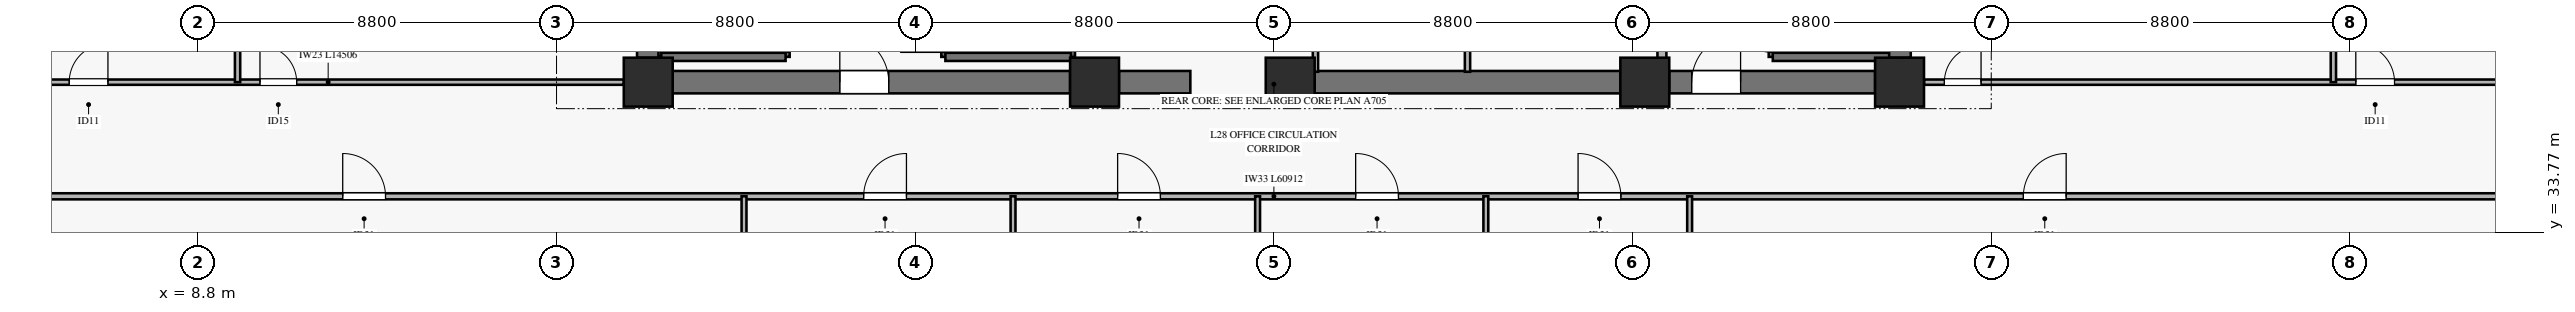
"""IFC4 building model, lengths in metres.
Left out: names, types, materials, properties, quantities, classifications, styles, units other than length and angle.
Written with IfcOpenShell. Run it as: python <this file> out.ifc"""

import sys

from ifc_helpers import new_model, si_unit, direction, frame, frame_2d, origin, origin_2d, place, context, subcontext, project, spatial, rectangle, extrude, source, transform, mapped, element, fill, save


model = new_model("IFC4")
c1 = context("Model", 3, precision=1e-05, world=origin(), true_north=direction((0.0, 1.0)))
c2 = subcontext(c1, "Body", "Model", "MODEL_VIEW")
j1 = project(units=[si_unit("LENGTHUNIT", "METRE"), si_unit("PLANEANGLEUNIT", "RADIAN")], contexts=[c1])
p1 = place(None, origin())
s1 = spatial("IfcSite", under=j1, at=p1, CompositionType="ELEMENT")
p2 = place(p1, origin())
s2 = spatial("IfcBuilding", under=s1, at=p2, CompositionType="ELEMENT")
p3 = place(p2, frame((0.0, 0.0, 115.3)))
s3 = spatial("IfcBuildingStorey", under=s2, at=p3, CompositionType="ELEMENT", Elevation=115.3)
m1 = source(origin(), c2, "Body", "SweptSolid", [
    extrude(rectangle(XDim=1.2, YDim=1.2, at=origin_2d()), origin(), (0.0, 0.0, 1.0), 3.68),
])
for number, where, z_axis, x_axis in (
    (1, (19.85, 37.45, 0.0), (0.0, 0.0, 1.0), (1.0, 0.0, 0.0)),
    (2, (30.8, 37.45, 0.0), (0.0, 0.0, 1.0), (1.0, 0.0, 0.0)),
    (3, (35.6, 37.45, 0.0), (0.0, 0.0, 1.0), (1.0, 0.0, 0.0)),
    (4, (44.3, 37.45, 0.0), (0.0, 0.0, 1.0), (1.0, 0.0, 0.0)),
    (5, (50.55, 37.45, 0.0), (0.0, 0.0, 1.0), (1.0, 0.0, 0.0)),
):
    element("IfcColumn", number, at=place(p3, frame(where, z_axis=z_axis, x_axis=x_axis)), inside=s3, PredefinedType="PILASTER", context=c2, shape_type="MappedRepresentation", body=[
        mapped(m1, transform((0.0, 0.0, 0.0), x_axis=(1.0, 0.0, 0.0), y_axis=(0.0, 1.0, 0.0), z_axis=(0.0, 0.0, 1.0), scale=1.0)),
    ])
p4 = place(p3, frame((20.45, 37.45, 0.0), z_axis=(0.0, 0.0, 1.0), x_axis=(1.0, 0.0, 0.0)))
e6 = element("IfcWall", 6, at=p4, inside=s3, PredefinedType="SHEAR", context=c2, shape_type="SweptSolid", body=[
    extrude(rectangle(XDim=9.75, YDim=0.55, at=frame_2d((4.875, 0.0))), origin(), (0.0, 0.0, 1.0), 3.68),
])
p5 = place(p4, frame((4.1, 0.0, 0.0)))
e7 = element("IfcOpeningElement", 7, at=p5, cuts=e6, PredefinedType="OPENING", context=c2, shape_type="SweptSolid", body=[
    extrude(rectangle(XDim=1.2, YDim=2.15, at=frame_2d((0.6, 1.075))), frame((0.0, 0.285, 0.0), z_axis=(0.0, -1.0, 0.0), x_axis=(1.0, 0.0, 0.0)), (0.0, 0.0, 1.0), 0.57),
])
p6 = place(p3, frame((31.4, 37.45, 0.0), z_axis=(0.0, 0.0, 1.0), x_axis=(1.0, 0.0, 0.0)))
e8 = element("IfcWall", 8, at=p6, inside=s3, PredefinedType="SHEAR", context=c2, shape_type="SweptSolid", body=[
    extrude(rectangle(XDim=1.75, YDim=0.55, at=frame_2d((0.875, 0.0))), origin(), (0.0, 0.0, 1.0), 3.68),
])
p7 = place(p3, frame((36.2, 37.45, 0.0), z_axis=(0.0, 0.0, 1.0), x_axis=(1.0, 0.0, 0.0)))
e9 = element("IfcWall", 9, at=p7, inside=s3, PredefinedType="SHEAR", context=c2, shape_type="SweptSolid", body=[
    extrude(rectangle(XDim=7.5, YDim=0.55, at=frame_2d((3.75, 0.0))), origin(), (0.0, 0.0, 1.0), 3.68),
])
p8 = place(p3, frame((44.9, 37.45, 0.0), z_axis=(0.0, 0.0, 1.0), x_axis=(1.0, 0.0, 0.0)))
e10 = element("IfcWall", 10, at=p8, inside=s3, PredefinedType="SHEAR", context=c2, shape_type="SweptSolid", body=[
    extrude(rectangle(XDim=5.05, YDim=0.55, at=frame_2d((2.525, 0.0))), origin(), (0.0, 0.0, 1.0), 3.68),
])
p9 = place(p8, frame((0.55, 0.0, 0.0)))
e11 = element("IfcOpeningElement", 11, at=p9, cuts=e10, PredefinedType="OPENING", context=c2, shape_type="SweptSolid", body=[
    extrude(rectangle(XDim=1.2, YDim=2.15, at=frame_2d((0.6, 1.075))), frame((0.0, 0.285, 0.0), z_axis=(0.0, -1.0, 0.0), x_axis=(1.0, 0.0, 0.0)), (0.0, 0.0, 1.0), 0.57),
])
for number, where, z_axis, x_axis in (
    (12, (19.85, 38.05, 0.0), (0.0, 0.0, 1.0), (0.0, 1.0, 0.0)),
    (13, (50.55, 38.05, 0.0), (0.0, 0.0, 1.0), (0.0, 1.0, 0.0)),
):
    element("IfcWall", number, at=place(p3, frame(where, z_axis=z_axis, x_axis=x_axis)), inside=s3, PredefinedType="SHEAR", context=c2, shape_type="SweptSolid", body=[
        extrude(rectangle(XDim=7.9, YDim=0.55, at=frame_2d((3.95, 0.0))), origin(), (0.0, 0.0, 1.0), 3.68),
    ])
p10 = place(p3, frame((20.17, 38.07, 0.0), z_axis=(0.0, 0.0, 1.0), x_axis=(0.0, 1.0, 0.0)))
e14 = element("IfcWall", 14, at=p10, inside=s3, PredefinedType="SOLIDWALL", context=c2, shape_type="SweptSolid", body=[
    extrude(rectangle(XDim=7.25, YDim=0.14, at=frame_2d((3.625, 0.0))), origin(), (0.0, 0.0, 1.0), 3.9),
])
p11 = place(p3, frame((23.22, 38.07, 0.0), z_axis=(0.0, 0.0, 1.0), x_axis=(0.0, 1.0, 0.0)))
e15 = element("IfcWall", 15, at=p11, inside=s3, PredefinedType="SOLIDWALL", context=c2, shape_type="SweptSolid", body=[
    extrude(rectangle(XDim=7.25, YDim=0.2, at=frame_2d((3.625, 0.0))), origin(), (0.0, 0.0, 1.0), 3.9),
])
p12 = place(p11, frame((0.11, 0.0, 0.0)))
e16 = element("IfcOpeningElement", 16, at=p12, cuts=e15, PredefinedType="OPENING", context=c2, shape_type="SweptSolid", body=[
    extrude(rectangle(XDim=1.1, YDim=2.15, at=frame_2d((0.55, 1.075))), frame((0.0, 0.11, 0.0), z_axis=(0.0, -1.0, 0.0), x_axis=(1.0, 0.0, 0.0)), (0.0, 0.0, 1.0), 0.22),
])
p13 = place(p3, frame((20.17, 38.07, 0.0), z_axis=(0.0, 0.0, 1.0), x_axis=(1.0, 0.0, 0.0)))
e17 = element("IfcWall", 17, at=p13, inside=s3, PredefinedType="SOLIDWALL", context=c2, shape_type="SweptSolid", body=[
    extrude(rectangle(XDim=3.05, YDim=0.2, at=frame_2d((1.525, 0.0))), origin(), (0.0, 0.0, 1.0), 3.9),
])
p14 = place(p3, frame((27.14, 38.07, 0.0), z_axis=(0.0, 0.0, 1.0), x_axis=(0.0, 1.0, 0.0)))
e18 = element("IfcWall", 18, at=p14, inside=s3, PredefinedType="SOLIDWALL", context=c2, shape_type="SweptSolid", body=[
    extrude(rectangle(XDim=7.25, YDim=0.2, at=frame_2d((3.625, 0.0))), origin(), (0.0, 0.0, 1.0), 3.9),
])
p15 = place(p14, frame((0.11, 0.0, 0.0)))
e19 = element("IfcOpeningElement", 19, at=p15, cuts=e18, PredefinedType="OPENING", context=c2, shape_type="SweptSolid", body=[
    extrude(rectangle(XDim=1.1, YDim=2.15, at=frame_2d((0.55, 1.075))), frame((0.0, 0.11, 0.0), z_axis=(0.0, -1.0, 0.0), x_axis=(1.0, 0.0, 0.0)), (0.0, 0.0, 1.0), 0.22),
])
p16 = place(p3, frame((30.22, 38.07, 0.0), z_axis=(0.0, 0.0, 1.0), x_axis=(0.0, 1.0, 0.0)))
e20 = element("IfcWall", 20, at=p16, inside=s3, PredefinedType="SOLIDWALL", context=c2, shape_type="SweptSolid", body=[
    extrude(rectangle(XDim=7.25, YDim=0.2, at=frame_2d((3.625, 0.0))), origin(), (0.0, 0.0, 1.0), 3.9),
])
p17 = place(p3, frame((27.14, 38.07, 0.0), z_axis=(0.0, 0.0, 1.0), x_axis=(1.0, 0.0, 0.0)))
e21 = element("IfcWall", 21, at=p17, inside=s3, PredefinedType="SOLIDWALL", context=c2, shape_type="SweptSolid", body=[
    extrude(rectangle(XDim=3.08, YDim=0.2, at=frame_2d((1.54, 0.0))), origin(), (0.0, 0.0, 1.0), 3.9),
])
p18 = place(p3, frame((47.44, 38.07, 0.0), z_axis=(0.0, 0.0, 1.0), x_axis=(0.0, 1.0, 0.0)))
e22 = element("IfcWall", 22, at=p18, inside=s3, PredefinedType="SOLIDWALL", context=c2, shape_type="SweptSolid", body=[
    extrude(rectangle(XDim=7.25, YDim=0.2, at=frame_2d((3.625, 0.0))), origin(), (0.0, 0.0, 1.0), 3.9),
])
p19 = place(p18, frame((0.11, 0.0, 0.0)))
e23 = element("IfcOpeningElement", 23, at=p19, cuts=e22, PredefinedType="OPENING", context=c2, shape_type="SweptSolid", body=[
    extrude(rectangle(XDim=1.1, YDim=2.15, at=frame_2d((0.55, 1.075))), frame((0.0, 0.11, 0.0), z_axis=(0.0, -1.0, 0.0), x_axis=(1.0, 0.0, 0.0)), (0.0, 0.0, 1.0), 0.22),
])
p20 = place(p3, frame((47.44, 38.07, 0.0), z_axis=(0.0, 0.0, 1.0), x_axis=(1.0, 0.0, 0.0)))
e24 = element("IfcWall", 24, at=p20, inside=s3, PredefinedType="SOLIDWALL", context=c2, shape_type="SweptSolid", body=[
    extrude(rectangle(XDim=2.855, YDim=0.2, at=frame_2d((1.427, 0.0))), origin(), (0.0, 0.0, 1.0), 3.9),
])
p21 = place(p3, frame((44.72, 37.705, 0.0), z_axis=(0.0, 0.0, 1.0), x_axis=(0.0, 1.0, 0.0)))
e25 = element("IfcWall", 25, at=p21, inside=s3, PredefinedType="SOLIDWALL", context=c2, shape_type="SweptSolid", body=[
    extrude(rectangle(XDim=7.515, YDim=0.22, at=frame_2d((3.757, 0.0))), origin(), (0.0, 0.0, 1.0), 3.68),
])
p22 = place(p3, frame((36.22, 37.705, 0.0), z_axis=(0.0, 0.0, 1.0), x_axis=(0.0, 1.0, 0.0)))
e26 = element("IfcWall", 26, at=p22, inside=s3, PredefinedType="PARTITIONING", context=c2, shape_type="SweptSolid", body=[
    extrude(rectangle(XDim=2.215, YDim=0.13, at=frame_2d((1.107, 0.0))), origin(), (0.0, 0.0, 1.0), 3.68),
])
p23 = place(p22, frame((0.905, 0.0, 0.0)))
e27 = element("IfcOpeningElement", 27, at=p23, cuts=e26, PredefinedType="OPENING", context=c2, shape_type="SweptSolid", body=[
    extrude(rectangle(XDim=0.9, YDim=2.1, at=frame_2d((0.45, 1.05))), frame((0.0, 0.075, 0.0), z_axis=(0.0, -1.0, 0.0), x_axis=(1.0, 0.0, 0.0)), (0.0, 0.0, 1.0), 0.15),
])
p24 = place(p3, frame((39.95, 37.705, 0.0), z_axis=(0.0, 0.0, 1.0), x_axis=(0.0, 1.0, 0.0)))
e28 = element("IfcWall", 28, at=p24, inside=s3, PredefinedType="PARTITIONING", context=c2, shape_type="SweptSolid", body=[
    extrude(rectangle(XDim=2.215, YDim=0.13, at=frame_2d((1.107, 0.0))), origin(), (0.0, 0.0, 1.0), 3.68),
])
p25 = place(p24, frame((0.615, 0.0, 0.0)))
e29 = element("IfcOpeningElement", 29, at=p25, cuts=e28, PredefinedType="OPENING", context=c2, shape_type="SweptSolid", body=[
    extrude(rectangle(XDim=0.9, YDim=2.1, at=frame_2d((0.45, 1.05))), frame((0.0, 0.075, 0.0), z_axis=(0.0, -1.0, 0.0), x_axis=(1.0, 0.0, 0.0)), (0.0, 0.0, 1.0), 0.15),
])
p26 = place(p3, frame((4.744, 34.65, 0.0), z_axis=(0.0, 0.0, 1.0), x_axis=(1.0, 0.0, 0.0)))
e30 = element("IfcWall", 30, at=p26, inside=s3, PredefinedType="PARTITIONING", context=c2, shape_type="SweptSolid", body=[
    extrude(rectangle(XDim=60.912, YDim=0.15, at=frame_2d((30.456, 0.0))), origin(), (0.0, 0.0, 1.0), 2.765),
])
p27 = place(p26, frame((7.61, 0.0, 0.0)))
e31 = element("IfcOpeningElement", 31, at=p27, cuts=e30, PredefinedType="OPENING", context=c2, shape_type="SweptSolid", body=[
    extrude(rectangle(XDim=1.05, YDim=2.15, at=frame_2d((0.525, 1.075))), frame((0.0, 0.085, 0.0), z_axis=(0.0, -1.0, 0.0), x_axis=(1.0, 0.0, 0.0)), (0.0, 0.0, 1.0), 0.17),
])
p28 = place(p26, frame((20.391, 0.0, 0.0)))
e32 = element("IfcOpeningElement", 32, at=p28, cuts=e30, PredefinedType="OPENING", context=c2, shape_type="SweptSolid", body=[
    extrude(rectangle(XDim=1.05, YDim=2.15, at=frame_2d((0.525, 1.075))), frame((0.0, 0.085, 0.0), z_axis=(0.0, -1.0, 0.0), x_axis=(1.0, 0.0, 0.0)), (0.0, 0.0, 1.0), 0.17),
])
p29 = place(p26, frame((26.622, 0.0, 0.0)))
e33 = element("IfcOpeningElement", 33, at=p29, cuts=e30, PredefinedType="OPENING", context=c2, shape_type="SweptSolid", body=[
    extrude(rectangle(XDim=1.05, YDim=2.15, at=frame_2d((0.525, 1.075))), frame((0.0, 0.085, 0.0), z_axis=(0.0, -1.0, 0.0), x_axis=(1.0, 0.0, 0.0)), (0.0, 0.0, 1.0), 0.17),
])
p30 = place(p26, frame((32.462, 0.0, 0.0)))
e34 = element("IfcOpeningElement", 34, at=p30, cuts=e30, PredefinedType="OPENING", context=c2, shape_type="SweptSolid", body=[
    extrude(rectangle(XDim=1.05, YDim=2.15, at=frame_2d((0.525, 1.075))), frame((0.0, 0.085, 0.0), z_axis=(0.0, -1.0, 0.0), x_axis=(1.0, 0.0, 0.0)), (0.0, 0.0, 1.0), 0.17),
])
p31 = place(p26, frame((37.919, 0.0, 0.0)))
e35 = element("IfcOpeningElement", 35, at=p31, cuts=e30, PredefinedType="OPENING", context=c2, shape_type="SweptSolid", body=[
    extrude(rectangle(XDim=1.05, YDim=2.15, at=frame_2d((0.525, 1.075))), frame((0.0, 0.085, 0.0), z_axis=(0.0, -1.0, 0.0), x_axis=(1.0, 0.0, 0.0)), (0.0, 0.0, 1.0), 0.17),
])
p32 = place(p26, frame((48.844, 0.0, 0.0)))
e36 = element("IfcOpeningElement", 36, at=p32, cuts=e30, PredefinedType="OPENING", context=c2, shape_type="SweptSolid", body=[
    extrude(rectangle(XDim=1.05, YDim=2.15, at=frame_2d((0.525, 1.075))), frame((0.0, 0.085, 0.0), z_axis=(0.0, -1.0, 0.0), x_axis=(1.0, 0.0, 0.0)), (0.0, 0.0, 1.0), 0.17),
])
for number, where, z_axis, x_axis in (
    (37, (22.2, 6.99, 0.0), (0.0, 0.0, 1.0), (0.0, 1.0, 0.0)),
    (38, (28.8, 6.99, 0.0), (0.0, 0.0, 1.0), (0.0, 1.0, 0.0)),
    (39, (34.8, 6.99, 0.0), (0.0, 0.0, 1.0), (0.0, 1.0, 0.0)),
    (40, (40.4, 6.99, 0.0), (0.0, 0.0, 1.0), (0.0, 1.0, 0.0)),
    (41, (45.4, 6.99, 0.0), (0.0, 0.0, 1.0), (0.0, 1.0, 0.0)),
):
    element("IfcWall", number, at=place(p3, frame(where, z_axis=z_axis, x_axis=x_axis)), inside=s3, PredefinedType="PARTITIONING", context=c2, shape_type="SweptSolid", body=[
        extrude(rectangle(XDim=27.66, YDim=0.12, at=frame_2d((13.83, 0.0))), origin(), (0.0, 0.0, 1.0), 3.165),
    ])
p33 = place(p3, frame((4.744, 37.45, 0.0), z_axis=(0.0, 0.0, 1.0), x_axis=(1.0, 0.0, 0.0)))
e42 = element("IfcWall", 42, at=p33, inside=s3, PredefinedType="PARTITIONING", context=c2, shape_type="SweptSolid", body=[
    extrude(rectangle(XDim=14.506, YDim=0.13, at=frame_2d((7.253, 0.0))), origin(), (0.0, 0.0, 1.0), 3.165),
])
p34 = place(p33, frame((0.9, 0.0, 0.0)))
e43 = element("IfcOpeningElement", 43, at=p34, cuts=e42, PredefinedType="OPENING", context=c2, shape_type="SweptSolid", body=[
    extrude(rectangle(XDim=0.95, YDim=2.1, at=frame_2d((0.475, 1.05))), frame((0.0, 0.075, 0.0), z_axis=(0.0, -1.0, 0.0), x_axis=(1.0, 0.0, 0.0)), (0.0, 0.0, 1.0), 0.15),
])
p35 = place(p33, frame((5.58, 0.0, 0.0)))
e44 = element("IfcOpeningElement", 44, at=p35, cuts=e42, PredefinedType="OPENING", context=c2, shape_type="SweptSolid", body=[
    extrude(rectangle(XDim=0.9, YDim=2.1, at=frame_2d((0.45, 1.05))), frame((0.0, 0.075, 0.0), z_axis=(0.0, -1.0, 0.0), x_axis=(1.0, 0.0, 0.0)), (0.0, 0.0, 1.0), 0.15),
])
p36 = place(p3, frame((9.774, 37.45, 0.0), z_axis=(0.0, 0.0, 1.0), x_axis=(0.0, 1.0, 0.0)))
e45 = element("IfcWall", 45, at=p36, inside=s3, PredefinedType="PARTITIONING", context=c2, shape_type="SweptSolid", body=[
    extrude(rectangle(XDim=8.8, YDim=0.13, at=frame_2d((4.4, 0.0))), origin(), (0.0, 0.0, 1.0), 3.68),
])
p37 = place(p3, frame((51.15, 37.45, 0.0), z_axis=(0.0, 0.0, 1.0), x_axis=(1.0, 0.0, 0.0)))
e46 = element("IfcWall", 46, at=p37, inside=s3, PredefinedType="PARTITIONING", context=c2, shape_type="SweptSolid", body=[
    extrude(rectangle(XDim=14.506, YDim=0.13, at=frame_2d((7.253, 0.0))), origin(), (0.0, 0.0, 1.0), 3.165),
])
p38 = place(p37, frame((0.5, 0.0, 0.0)))
e47 = element("IfcOpeningElement", 47, at=p38, cuts=e46, PredefinedType="OPENING", context=c2, shape_type="SweptSolid", body=[
    extrude(rectangle(XDim=0.9, YDim=2.1, at=frame_2d((0.45, 1.05))), frame((0.0, 0.075, 0.0), z_axis=(0.0, -1.0, 0.0), x_axis=(1.0, 0.0, 0.0)), (0.0, 0.0, 1.0), 0.15),
])
p39 = place(p37, frame((10.594, 0.0, 0.0)))
e48 = element("IfcOpeningElement", 48, at=p39, cuts=e46, PredefinedType="OPENING", context=c2, shape_type="SweptSolid", body=[
    extrude(rectangle(XDim=0.95, YDim=2.1, at=frame_2d((0.475, 1.05))), frame((0.0, 0.075, 0.0), z_axis=(0.0, -1.0, 0.0), x_axis=(1.0, 0.0, 0.0)), (0.0, 0.0, 1.0), 0.15),
])
p40 = place(p3, frame((61.194, 37.45, 0.0), z_axis=(0.0, 0.0, 1.0), x_axis=(0.0, 1.0, 0.0)))
e49 = element("IfcWall", 49, at=p40, inside=s3, PredefinedType="PARTITIONING", context=c2, shape_type="SweptSolid", body=[
    extrude(rectangle(XDim=8.8, YDim=0.13, at=frame_2d((4.4, 0.0))), origin(), (0.0, 0.0, 1.0), 3.68),
])
m2 = source(origin(), c2, "Body", "SweptSolid", [
    extrude(rectangle(XDim=1.2, YDim=2.15, at=frame_2d((0.6, 1.075))), frame((0.0, 0.025, 0.0), z_axis=(0.0, -1.0, 0.0), x_axis=(1.0, 0.0, 0.0)), (0.0, 0.0, 1.0), 0.05),
])
p41 = place(p5, origin())
e50 = element("IfcDoor", 50, at=p41, inside=s3, OperationType="SINGLE_SWING_LEFT", PredefinedType="DOOR", context=c2, shape_type="MappedRepresentation", body=[
    mapped(m2, transform((0.0, 0.0, 0.0), x_axis=(1.0, 0.0, 0.0), y_axis=(0.0, 1.0, 0.0), z_axis=(0.0, 0.0, 1.0), scale=1.0)),
])
fill(e7, e50)
p42 = place(p9, origin())
e51 = element("IfcDoor", 51, at=p42, inside=s3, OperationType="SINGLE_SWING_RIGHT", PredefinedType="DOOR", context=c2, shape_type="MappedRepresentation", body=[
    mapped(m2, transform((0.0, 0.0, 0.0), x_axis=(1.0, 0.0, 0.0), y_axis=(0.0, 1.0, 0.0), z_axis=(0.0, 0.0, 1.0), scale=1.0)),
])
fill(e11, e51)
m3 = source(origin(), c2, "Body", "SweptSolid", [
    extrude(rectangle(XDim=1.05, YDim=2.15, at=frame_2d((0.525, 1.075))), frame((0.0, 0.025, 0.0), z_axis=(0.0, -1.0, 0.0), x_axis=(1.0, 0.0, 0.0)), (0.0, 0.0, 1.0), 0.05),
])
p43 = place(p27, origin())
e52 = element("IfcDoor", 52, at=p43, inside=s3, OperationType="SINGLE_SWING_LEFT", PredefinedType="DOOR", context=c2, shape_type="MappedRepresentation", body=[
    mapped(m3, transform((0.0, 0.0, 0.0), x_axis=(1.0, 0.0, 0.0), y_axis=(0.0, 1.0, 0.0), z_axis=(0.0, 0.0, 1.0), scale=1.0)),
])
fill(e31, e52)
p44 = place(p28, origin())
e53 = element("IfcDoor", 53, at=p44, inside=s3, OperationType="SINGLE_SWING_RIGHT", PredefinedType="DOOR", context=c2, shape_type="MappedRepresentation", body=[
    mapped(m3, transform((0.0, 0.0, 0.0), x_axis=(1.0, 0.0, 0.0), y_axis=(0.0, 1.0, 0.0), z_axis=(0.0, 0.0, 1.0), scale=1.0)),
])
fill(e32, e53)
p45 = place(p29, origin())
e54 = element("IfcDoor", 54, at=p45, inside=s3, OperationType="SINGLE_SWING_LEFT", PredefinedType="DOOR", context=c2, shape_type="MappedRepresentation", body=[
    mapped(m3, transform((0.0, 0.0, 0.0), x_axis=(1.0, 0.0, 0.0), y_axis=(0.0, 1.0, 0.0), z_axis=(0.0, 0.0, 1.0), scale=1.0)),
])
fill(e33, e54)
p46 = place(p30, origin())
e55 = element("IfcDoor", 55, at=p46, inside=s3, OperationType="SINGLE_SWING_LEFT", PredefinedType="DOOR", context=c2, shape_type="MappedRepresentation", body=[
    mapped(m3, transform((0.0, 0.0, 0.0), x_axis=(1.0, 0.0, 0.0), y_axis=(0.0, 1.0, 0.0), z_axis=(0.0, 0.0, 1.0), scale=1.0)),
])
fill(e34, e55)
p47 = place(p31, origin())
e56 = element("IfcDoor", 56, at=p47, inside=s3, OperationType="SINGLE_SWING_LEFT", PredefinedType="DOOR", context=c2, shape_type="MappedRepresentation", body=[
    mapped(m3, transform((0.0, 0.0, 0.0), x_axis=(1.0, 0.0, 0.0), y_axis=(0.0, 1.0, 0.0), z_axis=(0.0, 0.0, 1.0), scale=1.0)),
])
fill(e35, e56)
p48 = place(p32, origin())
e57 = element("IfcDoor", 57, at=p48, inside=s3, OperationType="SINGLE_SWING_RIGHT", PredefinedType="DOOR", context=c2, shape_type="MappedRepresentation", body=[
    mapped(m3, transform((0.0, 0.0, 0.0), x_axis=(1.0, 0.0, 0.0), y_axis=(0.0, 1.0, 0.0), z_axis=(0.0, 0.0, 1.0), scale=1.0)),
])
fill(e36, e57)
m4 = source(origin(), c2, "Body", "SweptSolid", [
    extrude(rectangle(XDim=0.95, YDim=2.1, at=frame_2d((0.475, 1.05))), frame((0.0, 0.025, 0.0), z_axis=(0.0, -1.0, 0.0), x_axis=(1.0, 0.0, 0.0)), (0.0, 0.0, 1.0), 0.05),
])
p49 = place(p34, origin())
e58 = element("IfcDoor", 58, at=p49, inside=s3, OperationType="SINGLE_SWING_RIGHT", PredefinedType="DOOR", context=c2, shape_type="MappedRepresentation", body=[
    mapped(m4, transform((0.0, 0.0, 0.0), x_axis=(1.0, 0.0, 0.0), y_axis=(0.0, 1.0, 0.0), z_axis=(0.0, 0.0, 1.0), scale=1.0)),
])
fill(e43, e58)
m5 = source(origin(), c2, "Body", "SweptSolid", [
    extrude(rectangle(XDim=0.9, YDim=2.1, at=frame_2d((0.45, 1.05))), frame((0.0, 0.025, 0.0), z_axis=(0.0, -1.0, 0.0), x_axis=(1.0, 0.0, 0.0)), (0.0, 0.0, 1.0), 0.05),
])
p50 = place(p35, origin())
e59 = element("IfcDoor", 59, at=p50, inside=s3, OperationType="SINGLE_SWING_LEFT", PredefinedType="DOOR", context=c2, shape_type="MappedRepresentation", body=[
    mapped(m5, transform((0.0, 0.0, 0.0), x_axis=(1.0, 0.0, 0.0), y_axis=(0.0, 1.0, 0.0), z_axis=(0.0, 0.0, 1.0), scale=1.0)),
])
fill(e44, e59)
p51 = place(p38, origin())
e60 = element("IfcDoor", 60, at=p51, inside=s3, OperationType="SINGLE_SWING_RIGHT", PredefinedType="DOOR", context=c2, shape_type="MappedRepresentation", body=[
    mapped(m5, transform((0.0, 0.0, 0.0), x_axis=(1.0, 0.0, 0.0), y_axis=(0.0, 1.0, 0.0), z_axis=(0.0, 0.0, 1.0), scale=1.0)),
])
fill(e47, e60)
p52 = place(p39, origin())
e61 = element("IfcDoor", 61, at=p52, inside=s3, OperationType="SINGLE_SWING_LEFT", PredefinedType="DOOR", context=c2, shape_type="MappedRepresentation", body=[
    mapped(m4, transform((0.0, 0.0, 0.0), x_axis=(1.0, 0.0, 0.0), y_axis=(0.0, 1.0, 0.0), z_axis=(0.0, 0.0, 1.0), scale=1.0)),
])
fill(e48, e61)
save(model, sys.argv[1])
